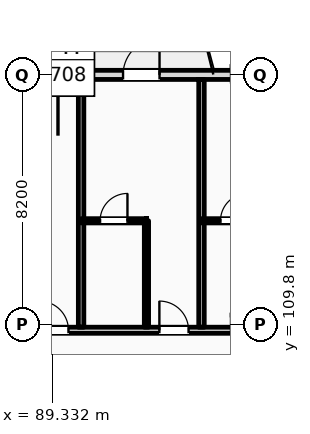
"""IFC4 building model, lengths in metres.
Left out: names, types, materials, properties, quantities, classifications, styles, units other than length and angle.
Written with IfcOpenShell. Run it as: python <this file> out.ifc"""

import sys

from ifc_helpers import new_model, si_unit, direction, frame, frame_2d, origin, place, context, subcontext, project, spatial, rectangle, extrude, element, fill, save


model = new_model("IFC4")
c1 = context("Model", 3, precision=1e-05, world=origin(), true_north=direction((0.0, 1.0)))
c2 = subcontext(c1, "Body", "Model", "MODEL_VIEW")
j1 = project(units=[si_unit("LENGTHUNIT", "METRE"), si_unit("PLANEANGLEUNIT", "RADIAN")], contexts=[c1])
p1 = place(None, origin())
s1 = spatial("IfcSite", under=j1, at=p1, CompositionType="ELEMENT")
p2 = place(p1, origin())
s2 = spatial("IfcBuilding", under=s1, at=p2, CompositionType="ELEMENT")
p3 = place(p2, frame((0.0, 0.0, 20.4)))
s3 = spatial("IfcBuildingStorey", under=s2, at=p3, CompositionType="ELEMENT", Elevation=20.4)
p4 = place(p3, frame((22.5, 118.0, 0.0), z_axis=(0.0, 0.0, 1.0), x_axis=(1.0, 0.0, 0.0)))
e1 = element("IfcWall", 1, at=p4, inside=s3, PredefinedType="STANDARD", context=c2, shape_type="SweptSolid", body=[
    extrude(rectangle(XDim=97.5, YDim=0.3, at=frame_2d((48.75, 0.0))), origin(), (0.0, 0.0, 1.0), 3.38),
])
p5 = place(p4, frame((0.91, 0.0, 0.9)))
e2 = element("IfcOpeningElement", 2, at=p5, cuts=e1, PredefinedType="OPENING", context=c2, shape_type="SweptSolid", body=[
    extrude(rectangle(XDim=0.9, YDim=1.8, at=frame_2d((0.45, 0.9))), frame((0.0, 0.16, 0.0), z_axis=(0.0, -1.0, 0.0), x_axis=(1.0, 0.0, 0.0)), (0.0, 0.0, 1.0), 0.32),
])
p6 = place(p4, frame((6.36, 0.0, 0.0)))
e3 = element("IfcOpeningElement", 3, at=p6, cuts=e1, PredefinedType="OPENING", context=c2, shape_type="SweptSolid", body=[
    extrude(rectangle(XDim=1.2, YDim=2.25, at=frame_2d((0.6, 1.125))), frame((0.0, 0.16, 0.0), z_axis=(0.0, -1.0, 0.0), x_axis=(1.0, 0.0, 0.0)), (0.0, 0.0, 1.0), 0.32),
])
p7 = place(p4, frame((11.41, 0.0, 0.9)))
e4 = element("IfcOpeningElement", 4, at=p7, cuts=e1, PredefinedType="OPENING", context=c2, shape_type="SweptSolid", body=[
    extrude(rectangle(XDim=1.1, YDim=1.9, at=frame_2d((0.55, 0.95))), frame((0.0, 0.16, 0.0), z_axis=(0.0, -1.0, 0.0), x_axis=(1.0, 0.0, 0.0)), (0.0, 0.0, 1.0), 0.32),
])
p8 = place(p4, frame((14.335, 0.0, 0.9)))
e5 = element("IfcOpeningElement", 5, at=p8, cuts=e1, PredefinedType="OPENING", context=c2, shape_type="SweptSolid", body=[
    extrude(rectangle(XDim=1.65, YDim=1.95, at=frame_2d((0.825, 0.975))), frame((0.0, 0.16, 0.0), z_axis=(0.0, -1.0, 0.0), x_axis=(1.0, 0.0, 0.0)), (0.0, 0.0, 1.0), 0.32),
])
p9 = place(p4, frame((19.26, 0.0, 0.9)))
e6 = element("IfcOpeningElement", 6, at=p9, cuts=e1, PredefinedType="OPENING", context=c2, shape_type="SweptSolid", body=[
    extrude(rectangle(XDim=1.35, YDim=2.0, at=frame_2d((0.675, 1.0))), frame((0.0, 0.16, 0.0), z_axis=(0.0, -1.0, 0.0), x_axis=(1.0, 0.0, 0.0)), (0.0, 0.0, 1.0), 0.32),
])
p10 = place(p4, frame((22.8, 0.0, 0.0)))
e7 = element("IfcOpeningElement", 7, at=p10, cuts=e1, PredefinedType="OPENING", context=c2, shape_type="SweptSolid", body=[
    extrude(rectangle(XDim=1.2, YDim=2.25, at=frame_2d((0.6, 1.125))), frame((0.0, 0.16, 0.0), z_axis=(0.0, -1.0, 0.0), x_axis=(1.0, 0.0, 0.0)), (0.0, 0.0, 1.0), 0.32),
])
p11 = place(p4, frame((26.91, 0.0, 0.9)))
e8 = element("IfcOpeningElement", 8, at=p11, cuts=e1, PredefinedType="OPENING", context=c2, shape_type="SweptSolid", body=[
    extrude(rectangle(XDim=2.1, YDim=2.1, at=frame_2d((1.05, 1.05))), frame((0.0, 0.16, 0.0), z_axis=(0.0, -1.0, 0.0), x_axis=(1.0, 0.0, 0.0)), (0.0, 0.0, 1.0), 0.32),
])
p12 = place(p4, frame((30.835, 0.0, 0.9)))
e9 = element("IfcOpeningElement", 9, at=p12, cuts=e1, PredefinedType="OPENING", context=c2, shape_type="SweptSolid", body=[
    extrude(rectangle(XDim=2.25, YDim=2.15, at=frame_2d((1.125, 1.075))), frame((0.0, 0.16, 0.0), z_axis=(0.0, -1.0, 0.0), x_axis=(1.0, 0.0, 0.0)), (0.0, 0.0, 1.0), 0.32),
])
p13 = place(p4, frame((34.96, 0.0, 0.9)))
e10 = element("IfcOpeningElement", 10, at=p13, cuts=e1, PredefinedType="OPENING", context=c2, shape_type="SweptSolid", body=[
    extrude(rectangle(XDim=2.4, YDim=2.2, at=frame_2d((1.2, 1.1))), frame((0.0, 0.16, 0.0), z_axis=(0.0, -1.0, 0.0), x_axis=(1.0, 0.0, 0.0)), (0.0, 0.0, 1.0), 0.32),
])
p14 = place(p4, frame((39.0, 0.0, 0.0)))
e11 = element("IfcOpeningElement", 11, at=p14, cuts=e1, PredefinedType="OPENING", context=c2, shape_type="SweptSolid", body=[
    extrude(rectangle(XDim=1.2, YDim=2.25, at=frame_2d((0.6, 1.125))), frame((0.0, 0.16, 0.0), z_axis=(0.0, -1.0, 0.0), x_axis=(1.0, 0.0, 0.0)), (0.0, 0.0, 1.0), 0.32),
])
p15 = place(p4, frame((43.21, 0.0, 0.9)))
e12 = element("IfcOpeningElement", 12, at=p15, cuts=e1, PredefinedType="OPENING", context=c2, shape_type="SweptSolid", body=[
    extrude(rectangle(XDim=2.7, YDim=2.3, at=frame_2d((1.35, 1.15))), frame((0.0, 0.16, 0.0), z_axis=(0.0, -1.0, 0.0), x_axis=(1.0, 0.0, 0.0)), (0.0, 0.0, 1.0), 0.32),
])
p16 = place(p4, frame((47.335, 0.0, 0.9)))
e13 = element("IfcOpeningElement", 13, at=p16, cuts=e1, PredefinedType="OPENING", context=c2, shape_type="SweptSolid", body=[
    extrude(rectangle(XDim=1.35, YDim=2.3, at=frame_2d((0.675, 1.15))), frame((0.0, 0.16, 0.0), z_axis=(0.0, -1.0, 0.0), x_axis=(1.0, 0.0, 0.0)), (0.0, 0.0, 1.0), 0.32),
])
p17 = place(p4, frame((52.74, 0.0, 0.0)))
e14 = element("IfcOpeningElement", 14, at=p17, cuts=e1, PredefinedType="OPENING", context=c2, shape_type="SweptSolid", body=[
    extrude(rectangle(XDim=1.2, YDim=2.25, at=frame_2d((0.6, 1.125))), frame((0.0, 0.16, 0.0), z_axis=(0.0, -1.0, 0.0), x_axis=(1.0, 0.0, 0.0)), (0.0, 0.0, 1.0), 0.32),
])
p18 = place(p4, frame((55.36, 0.0, 0.9)))
e15 = element("IfcOpeningElement", 15, at=p18, cuts=e1, PredefinedType="OPENING", context=c2, shape_type="SweptSolid", body=[
    extrude(rectangle(XDim=1.1, YDim=2.3, at=frame_2d((0.55, 1.15))), frame((0.0, 0.16, 0.0), z_axis=(0.0, -1.0, 0.0), x_axis=(1.0, 0.0, 0.0)), (0.0, 0.0, 1.0), 0.32),
])
p19 = place(p4, frame((59.99, 0.0, 0.9)))
e16 = element("IfcOpeningElement", 16, at=p19, cuts=e1, PredefinedType="OPENING", context=c2, shape_type="SweptSolid", body=[
    extrude(rectangle(XDim=2.74, YDim=2.3, at=frame_2d((1.37, 1.15))), frame((0.0, 0.16, 0.0), z_axis=(0.0, -1.0, 0.0), x_axis=(1.0, 0.0, 0.0)), (0.0, 0.0, 1.0), 0.32),
])
p20 = place(p4, frame((65.95, 0.0, 0.9)))
e17 = element("IfcOpeningElement", 17, at=p20, cuts=e1, PredefinedType="OPENING", context=c2, shape_type="SweptSolid", body=[
    extrude(rectangle(XDim=1.35, YDim=2.3, at=frame_2d((0.675, 1.15))), frame((0.0, 0.16, 0.0), z_axis=(0.0, -1.0, 0.0), x_axis=(1.0, 0.0, 0.0)), (0.0, 0.0, 1.0), 0.32),
])
p21 = place(p4, frame((69.16, 0.0, 0.0)))
e18 = element("IfcOpeningElement", 18, at=p21, cuts=e1, PredefinedType="OPENING", context=c2, shape_type="SweptSolid", body=[
    extrude(rectangle(XDim=1.2, YDim=2.25, at=frame_2d((0.6, 1.125))), frame((0.0, 0.16, 0.0), z_axis=(0.0, -1.0, 0.0), x_axis=(1.0, 0.0, 0.0)), (0.0, 0.0, 1.0), 0.32),
])
p22 = place(p4, frame((73.75, 0.0, 0.9)))
e19 = element("IfcOpeningElement", 19, at=p22, cuts=e1, PredefinedType="OPENING", context=c2, shape_type="SweptSolid", body=[
    extrude(rectangle(XDim=1.8, YDim=2.3, at=frame_2d((0.9, 1.15))), frame((0.0, 0.16, 0.0), z_axis=(0.0, -1.0, 0.0), x_axis=(1.0, 0.0, 0.0)), (0.0, 0.0, 1.0), 0.32),
])
p23 = place(p4, frame((76.79, 0.0, 0.9)))
e20 = element("IfcOpeningElement", 20, at=p23, cuts=e1, PredefinedType="OPENING", context=c2, shape_type="SweptSolid", body=[
    extrude(rectangle(XDim=2.74, YDim=2.3, at=frame_2d((1.37, 1.15))), frame((0.0, 0.16, 0.0), z_axis=(0.0, -1.0, 0.0), x_axis=(1.0, 0.0, 0.0)), (0.0, 0.0, 1.0), 0.32),
])
p24 = place(p4, frame((81.55, 0.0, 0.9)))
e21 = element("IfcOpeningElement", 21, at=p24, cuts=e1, PredefinedType="OPENING", context=c2, shape_type="SweptSolid", body=[
    extrude(rectangle(XDim=1.8, YDim=2.3, at=frame_2d((0.9, 1.15))), frame((0.0, 0.16, 0.0), z_axis=(0.0, -1.0, 0.0), x_axis=(1.0, 0.0, 0.0)), (0.0, 0.0, 1.0), 0.32),
])
p25 = place(p4, frame((86.01, 0.0, 0.9)))
e22 = element("IfcOpeningElement", 22, at=p25, cuts=e1, PredefinedType="OPENING", context=c2, shape_type="SweptSolid", body=[
    extrude(rectangle(XDim=1.1, YDim=1.5, at=frame_2d((0.55, 0.75))), frame((0.0, 0.16, 0.0), z_axis=(0.0, -1.0, 0.0), x_axis=(1.0, 0.0, 0.0)), (0.0, 0.0, 1.0), 0.32),
])
p26 = place(p4, frame((90.135, 0.0, 0.9)))
e23 = element("IfcOpeningElement", 23, at=p26, cuts=e1, PredefinedType="OPENING", context=c2, shape_type="SweptSolid", body=[
    extrude(rectangle(XDim=1.25, YDim=1.6, at=frame_2d((0.625, 0.8))), frame((0.0, 0.16, 0.0), z_axis=(0.0, -1.0, 0.0), x_axis=(1.0, 0.0, 0.0)), (0.0, 0.0, 1.0), 0.32),
])
p27 = place(p4, frame((94.34, 0.0, 0.9)))
e24 = element("IfcOpeningElement", 24, at=p27, cuts=e1, PredefinedType="OPENING", context=c2, shape_type="SweptSolid", body=[
    extrude(rectangle(XDim=1.4, YDim=1.7, at=frame_2d((0.7, 0.85))), frame((0.0, 0.16, 0.0), z_axis=(0.0, -1.0, 0.0), x_axis=(1.0, 0.0, 0.0)), (0.0, 0.0, 1.0), 0.32),
])
p28 = place(p3, frame((10.65, 109.6, 0.0), z_axis=(0.0, 0.0, 1.0), x_axis=(1.0, 0.0, 0.0)))
e25 = element("IfcWall", 25, at=p28, inside=s3, PredefinedType="PARTITIONING", context=c2, shape_type="SweptSolid", body=[
    extrude(rectangle(XDim=109.21, YDim=0.2, at=frame_2d((54.605, 0.0))), origin(), (0.0, 0.0, 1.0), 3.38),
])
p29 = place(p28, frame((12.535, 0.0, 0.0)))
e26 = element("IfcOpeningElement", 26, at=p29, cuts=e25, PredefinedType="OPENING", context=c2, shape_type="SweptSolid", body=[
    extrude(rectangle(XDim=1.02, YDim=2.2, at=frame_2d((0.51, 1.1))), frame((0.0, 0.11, 0.0), z_axis=(0.0, -1.0, 0.0), x_axis=(1.0, 0.0, 0.0)), (0.0, 0.0, 1.0), 0.22),
])
p30 = place(p28, frame((19.175, 0.0, 0.0)))
e27 = element("IfcOpeningElement", 27, at=p30, cuts=e25, PredefinedType="OPENING", context=c2, shape_type="SweptSolid", body=[
    extrude(rectangle(XDim=1.02, YDim=2.2, at=frame_2d((0.51, 1.1))), frame((0.0, 0.11, 0.0), z_axis=(0.0, -1.0, 0.0), x_axis=(1.0, 0.0, 0.0)), (0.0, 0.0, 1.0), 0.22),
])
p31 = place(p28, frame((23.375, 0.0, 0.0)))
e28 = element("IfcOpeningElement", 28, at=p31, cuts=e25, PredefinedType="OPENING", context=c2, shape_type="SweptSolid", body=[
    extrude(rectangle(XDim=1.02, YDim=2.2, at=frame_2d((0.51, 1.1))), frame((0.0, 0.11, 0.0), z_axis=(0.0, -1.0, 0.0), x_axis=(1.0, 0.0, 0.0)), (0.0, 0.0, 1.0), 0.22),
])
p32 = place(p28, frame((27.575, 0.0, 0.0)))
e29 = element("IfcOpeningElement", 29, at=p32, cuts=e25, PredefinedType="OPENING", context=c2, shape_type="SweptSolid", body=[
    extrude(rectangle(XDim=1.02, YDim=2.2, at=frame_2d((0.51, 1.1))), frame((0.0, 0.11, 0.0), z_axis=(0.0, -1.0, 0.0), x_axis=(1.0, 0.0, 0.0)), (0.0, 0.0, 1.0), 0.22),
])
p33 = place(p28, frame((31.805, 0.0, 0.0)))
e30 = element("IfcOpeningElement", 30, at=p33, cuts=e25, PredefinedType="OPENING", context=c2, shape_type="SweptSolid", body=[
    extrude(rectangle(XDim=0.96, YDim=2.2, at=frame_2d((0.48, 1.1))), frame((0.0, 0.11, 0.0), z_axis=(0.0, -1.0, 0.0), x_axis=(1.0, 0.0, 0.0)), (0.0, 0.0, 1.0), 0.22),
])
p34 = place(p28, frame((33.855, 0.0, 0.0)))
e31 = element("IfcOpeningElement", 31, at=p34, cuts=e25, PredefinedType="OPENING", context=c2, shape_type="SweptSolid", body=[
    extrude(rectangle(XDim=0.96, YDim=2.2, at=frame_2d((0.48, 1.1))), frame((0.0, 0.11, 0.0), z_axis=(0.0, -1.0, 0.0), x_axis=(1.0, 0.0, 0.0)), (0.0, 0.0, 1.0), 0.22),
])
p35 = place(p28, frame((40.205, 0.0, 0.0)))
e32 = element("IfcOpeningElement", 32, at=p35, cuts=e25, PredefinedType="OPENING", context=c2, shape_type="SweptSolid", body=[
    extrude(rectangle(XDim=0.96, YDim=2.2, at=frame_2d((0.48, 1.1))), frame((0.0, 0.11, 0.0), z_axis=(0.0, -1.0, 0.0), x_axis=(1.0, 0.0, 0.0)), (0.0, 0.0, 1.0), 0.22),
])
p36 = place(p28, frame((42.255, 0.0, 0.0)))
e33 = element("IfcOpeningElement", 33, at=p36, cuts=e25, PredefinedType="OPENING", context=c2, shape_type="SweptSolid", body=[
    extrude(rectangle(XDim=0.96, YDim=2.2, at=frame_2d((0.48, 1.1))), frame((0.0, 0.11, 0.0), z_axis=(0.0, -1.0, 0.0), x_axis=(1.0, 0.0, 0.0)), (0.0, 0.0, 1.0), 0.22),
])
p37 = place(p28, frame((48.605, 0.0, 0.0)))
e34 = element("IfcOpeningElement", 34, at=p37, cuts=e25, PredefinedType="OPENING", context=c2, shape_type="SweptSolid", body=[
    extrude(rectangle(XDim=0.96, YDim=2.2, at=frame_2d((0.48, 1.1))), frame((0.0, 0.11, 0.0), z_axis=(0.0, -1.0, 0.0), x_axis=(1.0, 0.0, 0.0)), (0.0, 0.0, 1.0), 0.22),
])
p38 = place(p28, frame((50.655, 0.0, 0.0)))
e35 = element("IfcOpeningElement", 35, at=p38, cuts=e25, PredefinedType="OPENING", context=c2, shape_type="SweptSolid", body=[
    extrude(rectangle(XDim=0.96, YDim=2.2, at=frame_2d((0.48, 1.1))), frame((0.0, 0.11, 0.0), z_axis=(0.0, -1.0, 0.0), x_axis=(1.0, 0.0, 0.0)), (0.0, 0.0, 1.0), 0.22),
])
p39 = place(p28, frame((57.005, 0.0, 0.0)))
e36 = element("IfcOpeningElement", 36, at=p39, cuts=e25, PredefinedType="OPENING", context=c2, shape_type="SweptSolid", body=[
    extrude(rectangle(XDim=0.96, YDim=2.2, at=frame_2d((0.48, 1.1))), frame((0.0, 0.11, 0.0), z_axis=(0.0, -1.0, 0.0), x_axis=(1.0, 0.0, 0.0)), (0.0, 0.0, 1.0), 0.22),
])
p40 = place(p28, frame((59.055, 0.0, 0.0)))
e37 = element("IfcOpeningElement", 37, at=p40, cuts=e25, PredefinedType="OPENING", context=c2, shape_type="SweptSolid", body=[
    extrude(rectangle(XDim=0.96, YDim=2.2, at=frame_2d((0.48, 1.1))), frame((0.0, 0.11, 0.0), z_axis=(0.0, -1.0, 0.0), x_axis=(1.0, 0.0, 0.0)), (0.0, 0.0, 1.0), 0.22),
])
p41 = place(p28, frame((65.405, 0.0, 0.0)))
e38 = element("IfcOpeningElement", 38, at=p41, cuts=e25, PredefinedType="OPENING", context=c2, shape_type="SweptSolid", body=[
    extrude(rectangle(XDim=0.96, YDim=2.2, at=frame_2d((0.48, 1.1))), frame((0.0, 0.11, 0.0), z_axis=(0.0, -1.0, 0.0), x_axis=(1.0, 0.0, 0.0)), (0.0, 0.0, 1.0), 0.22),
])
p42 = place(p28, frame((67.205, 0.0, 0.0)))
e39 = element("IfcOpeningElement", 39, at=p42, cuts=e25, PredefinedType="OPENING", context=c2, shape_type="SweptSolid", body=[
    extrude(rectangle(XDim=0.96, YDim=2.2, at=frame_2d((0.48, 1.1))), frame((0.0, 0.11, 0.0), z_axis=(0.0, -1.0, 0.0), x_axis=(1.0, 0.0, 0.0)), (0.0, 0.0, 1.0), 0.22),
])
p43 = place(p28, frame((73.805, 0.0, 0.0)))
e40 = element("IfcOpeningElement", 40, at=p43, cuts=e25, PredefinedType="OPENING", context=c2, shape_type="SweptSolid", body=[
    extrude(rectangle(XDim=0.96, YDim=2.2, at=frame_2d((0.48, 1.1))), frame((0.0, 0.11, 0.0), z_axis=(0.0, -1.0, 0.0), x_axis=(1.0, 0.0, 0.0)), (0.0, 0.0, 1.0), 0.22),
])
p44 = place(p28, frame((78.255, 0.0, 0.0)))
e41 = element("IfcOpeningElement", 41, at=p44, cuts=e25, PredefinedType="OPENING", context=c2, shape_type="SweptSolid", body=[
    extrude(rectangle(XDim=0.96, YDim=2.2, at=frame_2d((0.48, 1.1))), frame((0.0, 0.11, 0.0), z_axis=(0.0, -1.0, 0.0), x_axis=(1.0, 0.0, 0.0)), (0.0, 0.0, 1.0), 0.22),
])
p45 = place(p28, frame((82.205, 0.0, 0.0)))
e42 = element("IfcOpeningElement", 42, at=p45, cuts=e25, PredefinedType="OPENING", context=c2, shape_type="SweptSolid", body=[
    extrude(rectangle(XDim=0.96, YDim=2.2, at=frame_2d((0.48, 1.1))), frame((0.0, 0.11, 0.0), z_axis=(0.0, -1.0, 0.0), x_axis=(1.0, 0.0, 0.0)), (0.0, 0.0, 1.0), 0.22),
])
p46 = place(p28, frame((86.405, 0.0, 0.0)))
e43 = element("IfcOpeningElement", 43, at=p46, cuts=e25, PredefinedType="OPENING", context=c2, shape_type="SweptSolid", body=[
    extrude(rectangle(XDim=0.96, YDim=2.2, at=frame_2d((0.48, 1.1))), frame((0.0, 0.11, 0.0), z_axis=(0.0, -1.0, 0.0), x_axis=(1.0, 0.0, 0.0)), (0.0, 0.0, 1.0), 0.22),
])
p47 = place(p28, frame((90.605, 0.0, 0.0)))
e44 = element("IfcOpeningElement", 44, at=p47, cuts=e25, PredefinedType="OPENING", context=c2, shape_type="SweptSolid", body=[
    extrude(rectangle(XDim=0.96, YDim=2.2, at=frame_2d((0.48, 1.1))), frame((0.0, 0.11, 0.0), z_axis=(0.0, -1.0, 0.0), x_axis=(1.0, 0.0, 0.0)), (0.0, 0.0, 1.0), 0.22),
])
p48 = place(p28, frame((94.805, 0.0, 0.0)))
e45 = element("IfcOpeningElement", 45, at=p48, cuts=e25, PredefinedType="OPENING", context=c2, shape_type="SweptSolid", body=[
    extrude(rectangle(XDim=0.96, YDim=2.2, at=frame_2d((0.48, 1.1))), frame((0.0, 0.11, 0.0), z_axis=(0.0, -1.0, 0.0), x_axis=(1.0, 0.0, 0.0)), (0.0, 0.0, 1.0), 0.22),
])
p49 = place(p28, frame((99.005, 0.0, 0.0)))
e46 = element("IfcOpeningElement", 46, at=p49, cuts=e25, PredefinedType="OPENING", context=c2, shape_type="SweptSolid", body=[
    extrude(rectangle(XDim=0.96, YDim=2.2, at=frame_2d((0.48, 1.1))), frame((0.0, 0.11, 0.0), z_axis=(0.0, -1.0, 0.0), x_axis=(1.0, 0.0, 0.0)), (0.0, 0.0, 1.0), 0.22),
])
p50 = place(p28, frame((103.205, 0.0, 0.0)))
e47 = element("IfcOpeningElement", 47, at=p50, cuts=e25, PredefinedType="OPENING", context=c2, shape_type="SweptSolid", body=[
    extrude(rectangle(XDim=0.96, YDim=2.2, at=frame_2d((0.48, 1.1))), frame((0.0, 0.11, 0.0), z_axis=(0.0, -1.0, 0.0), x_axis=(1.0, 0.0, 0.0)), (0.0, 0.0, 1.0), 0.22),
])
p51 = place(p28, frame((105.335, 0.0, 0.0)))
e48 = element("IfcOpeningElement", 48, at=p51, cuts=e25, PredefinedType="OPENING", context=c2, shape_type="SweptSolid", body=[
    extrude(rectangle(XDim=0.96, YDim=2.2, at=frame_2d((0.48, 1.1))), frame((0.0, 0.11, 0.0), z_axis=(0.0, -1.0, 0.0), x_axis=(1.0, 0.0, 0.0)), (0.0, 0.0, 1.0), 0.22),
])
p52 = place(p28, frame((2.716, 0.0, 0.0)))
e49 = element("IfcOpeningElement", 49, at=p52, cuts=e25, PredefinedType="OPENING", context=c2, shape_type="SweptSolid", body=[
    extrude(rectangle(XDim=1.35, YDim=2.25, at=frame_2d((0.675, 1.125))), frame((0.0, 0.11, 0.0), z_axis=(0.0, -1.0, 0.0), x_axis=(1.0, 0.0, 0.0)), (0.0, 0.0, 1.0), 0.22),
])
p53 = place(p28, frame((6.65, 0.0, 0.0)))
e50 = element("IfcOpeningElement", 50, at=p53, cuts=e25, PredefinedType="OPENING", context=c2, shape_type="SweptSolid", body=[
    extrude(rectangle(XDim=1.35, YDim=2.25, at=frame_2d((0.675, 1.125))), frame((0.0, 0.11, 0.0), z_axis=(0.0, -1.0, 0.0), x_axis=(1.0, 0.0, 0.0)), (0.0, 0.0, 1.0), 0.22),
])
p54 = place(p28, frame((10.583, 0.0, 0.0)))
e51 = element("IfcOpeningElement", 51, at=p54, cuts=e25, PredefinedType="OPENING", context=c2, shape_type="SweptSolid", body=[
    extrude(rectangle(XDim=1.35, YDim=2.25, at=frame_2d((0.675, 1.125))), frame((0.0, 0.11, 0.0), z_axis=(0.0, -1.0, 0.0), x_axis=(1.0, 0.0, 0.0)), (0.0, 0.0, 1.0), 0.22),
])
p55 = place(p3, frame((90.28, 109.7, 0.0), z_axis=(0.0, 0.0, 1.0), x_axis=(0.0, 1.0, 0.0)))
e52 = element("IfcWall", 52, at=p55, inside=s3, PredefinedType="PARTITIONING", context=c2, shape_type="SweptSolid", body=[
    extrude(rectangle(XDim=8.15, YDim=0.18, at=frame_2d((4.075, 0.0))), origin(), (0.0, 0.0, 1.0), 3.63),
])
p56 = place(p3, frame((94.24, 109.7, 0.0), z_axis=(0.0, 0.0, 1.0), x_axis=(0.0, 1.0, 0.0)))
e53 = element("IfcWall", 53, at=p56, inside=s3, PredefinedType="PARTITIONING", context=c2, shape_type="SweptSolid", body=[
    extrude(rectangle(XDim=8.15, YDim=0.18, at=frame_2d((4.075, 0.0))), origin(), (0.0, 0.0, 1.0), 3.94),
])
p57 = place(p3, frame((92.43, 109.7, 0.0), z_axis=(0.0, 0.0, 1.0), x_axis=(0.0, 1.0, 0.0)))
e54 = element("IfcWall", 54, at=p57, inside=s3, PredefinedType="PARTITIONING", context=c2, shape_type="SweptSolid", body=[
    extrude(rectangle(XDim=3.5, YDim=0.14, at=frame_2d((1.75, 0.0))), origin(), (0.0, 0.0, 1.0), 3.94),
])
p58 = place(p3, frame((90.28, 113.2, 0.0), z_axis=(0.0, 0.0, 1.0), x_axis=(1.0, 0.0, 0.0)))
e55 = element("IfcWall", 55, at=p58, inside=s3, PredefinedType="PARTITIONING", context=c2, shape_type="SweptSolid", body=[
    extrude(rectangle(XDim=2.15, YDim=0.14, at=frame_2d((1.075, 0.0))), origin(), (0.0, 0.0, 1.0), 3.94),
])
p59 = place(p58, frame((0.625, 0.0, 0.0)))
e56 = element("IfcOpeningElement", 56, at=p59, cuts=e55, PredefinedType="OPENING", context=c2, shape_type="SweptSolid", body=[
    extrude(rectangle(XDim=0.9, YDim=2.1, at=frame_2d((0.45, 1.05))), frame((0.0, 0.08, 0.0), z_axis=(0.0, -1.0, 0.0), x_axis=(1.0, 0.0, 0.0)), (0.0, 0.0, 1.0), 0.16),
])
p60 = place(p3, frame((94.24, 113.2, 0.0), z_axis=(0.0, 0.0, 1.0), x_axis=(1.0, 0.0, 0.0)))
e57 = element("IfcWall", 57, at=p60, inside=s3, PredefinedType="PARTITIONING", context=c2, shape_type="SweptSolid", body=[
    extrude(rectangle(XDim=2.15, YDim=0.14, at=frame_2d((1.075, 0.0))), origin(), (0.0, 0.0, 1.0), 3.94),
])
p61 = place(p60, frame((0.625, 0.0, 0.0)))
e58 = element("IfcOpeningElement", 58, at=p61, cuts=e57, PredefinedType="OPENING", context=c2, shape_type="SweptSolid", body=[
    extrude(rectangle(XDim=0.9, YDim=2.1, at=frame_2d((0.45, 1.05))), frame((0.0, 0.08, 0.0), z_axis=(0.0, -1.0, 0.0), x_axis=(1.0, 0.0, 0.0)), (0.0, 0.0, 1.0), 0.16),
])
p62 = place(p20, origin())
e59 = element("IfcWindow", 59, at=p62, inside=s3, PartitioningType="DOUBLE_PANEL_VERTICAL", PredefinedType="WINDOW", context=c2, shape_type="SweptSolid", body=[
    extrude(rectangle(XDim=1.35, YDim=2.3, at=frame_2d((0.675, 1.15))), frame((0.0, 0.03, 0.0), z_axis=(0.0, -1.0, 0.0), x_axis=(1.0, 0.0, 0.0)), (0.0, 0.0, 1.0), 0.06),
])
fill(e17, e59)
p63 = place(p21, origin())
e60 = element("IfcDoor", 60, at=p63, inside=s3, OperationType="SINGLE_SWING_RIGHT", PredefinedType="DOOR", context=c2, shape_type="SweptSolid", body=[
    extrude(rectangle(XDim=1.2, YDim=2.25, at=frame_2d((0.6, 1.125))), frame((0.0, 0.025, 0.0), z_axis=(0.0, -1.0, 0.0), x_axis=(1.0, 0.0, 0.0)), (0.0, 0.0, 1.0), 0.05),
])
fill(e18, e60)
p64 = place(p44, origin())
e61 = element("IfcDoor", 61, at=p64, inside=s3, OperationType="SINGLE_SWING_LEFT", PredefinedType="DOOR", context=c2, shape_type="SweptSolid", body=[
    extrude(rectangle(XDim=0.96, YDim=2.2, at=frame_2d((0.48, 1.1))), frame((0.0, 0.025, 0.0), z_axis=(0.0, -1.0, 0.0), x_axis=(1.0, 0.0, 0.0)), (0.0, 0.0, 1.0), 0.05),
])
fill(e41, e61)
p65 = place(p45, origin())
e62 = element("IfcDoor", 62, at=p65, inside=s3, OperationType="SINGLE_SWING_LEFT", PredefinedType="DOOR", context=c2, shape_type="SweptSolid", body=[
    extrude(rectangle(XDim=0.96, YDim=2.2, at=frame_2d((0.48, 1.1))), frame((0.0, 0.025, 0.0), z_axis=(0.0, -1.0, 0.0), x_axis=(1.0, 0.0, 0.0)), (0.0, 0.0, 1.0), 0.05),
])
fill(e42, e62)
p66 = place(p59, origin())
e63 = element("IfcDoor", 63, at=p66, inside=s3, OperationType="SINGLE_SWING_RIGHT", PredefinedType="DOOR", context=c2, shape_type="SweptSolid", body=[
    extrude(rectangle(XDim=0.9, YDim=2.1, at=frame_2d((0.45, 1.05))), frame((0.0, 0.025, 0.0), z_axis=(0.0, -1.0, 0.0), x_axis=(1.0, 0.0, 0.0)), (0.0, 0.0, 1.0), 0.05),
])
fill(e56, e63)
p67 = place(p61, origin())
e64 = element("IfcDoor", 64, at=p67, inside=s3, OperationType="SINGLE_SWING_RIGHT", PredefinedType="DOOR", context=c2, shape_type="SweptSolid", body=[
    extrude(rectangle(XDim=0.9, YDim=2.1, at=frame_2d((0.45, 1.05))), frame((0.0, 0.025, 0.0), z_axis=(0.0, -1.0, 0.0), x_axis=(1.0, 0.0, 0.0)), (0.0, 0.0, 1.0), 0.05),
])
fill(e58, e64)
save(model, sys.argv[1])
